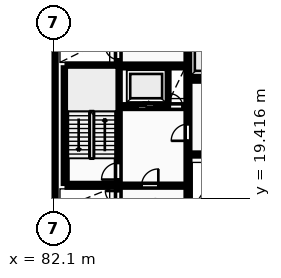
"""IFC4 building model, lengths in metres.
Left out: names, types, materials, properties, quantities, classifications, styles, units other than length and angle.
Written with IfcOpenShell. Run it as: python <this file> out.ifc"""

import sys

from ifc_helpers import new_model, si_unit, direction, frame, frame_2d, origin, place, context, subcontext, project, spatial, rectangle, extrude, element, fill, save


model = new_model("IFC4")
c1 = context("Model", 3, precision=1e-05, world=origin(), true_north=direction((0.0, 1.0)))
c2 = subcontext(c1, "Body", "Model", "MODEL_VIEW")
j1 = project(units=[si_unit("LENGTHUNIT", "METRE"), si_unit("PLANEANGLEUNIT", "RADIAN")], contexts=[c1])
p1 = place(None, origin())
s1 = spatial("IfcSite", under=j1, at=p1, CompositionType="ELEMENT")
p2 = place(p1, origin())
s2 = spatial("IfcBuilding", under=s1, at=p2, CompositionType="ELEMENT")
p3 = place(p2, frame((0.0, 0.0, 14.5)))
s3 = spatial("IfcBuildingStorey", under=s2, at=p3, CompositionType="ELEMENT", Elevation=14.5)
p4 = place(p3, frame((82.1, 18.575, 0.0), z_axis=(0.0, 0.0, 1.0), x_axis=(0.0, 1.0, 0.0)))
e1 = element("IfcWall", 1, at=p4, inside=s3, PredefinedType="SHEAR", context=c2, shape_type="SweptSolid", body=[
    extrude(rectangle(XDim=11.65, YDim=0.35, at=frame_2d((5.825, 0.0))), origin(), (0.0, 0.0, 1.0), 4.5),
])
p5 = place(p3, frame((82.875, 20.4, 0.0), z_axis=(0.0, 0.0, 1.0), x_axis=(0.0, 1.0, 0.0)))
e2 = element("IfcWall", 2, at=p5, inside=s3, PredefinedType="SHEAR", context=c2, shape_type="SweptSolid", body=[
    extrude(rectangle(XDim=7.6, YDim=0.25, at=frame_2d((3.8, 0.0))), origin(), (0.0, 0.0, 1.0), 4.5),
])
p6 = place(p3, frame((86.365, 18.6, 0.0), z_axis=(0.0, 0.0, 1.0), x_axis=(0.0, 1.0, 0.0)))
e3 = element("IfcWall", 3, at=p6, inside=s3, PredefinedType="SHEAR", context=c2, shape_type="SweptSolid", body=[
    extrude(rectangle(XDim=11.6, YDim=0.25, at=frame_2d((5.8, 0.0))), origin(), (0.0, 0.0, 1.0), 4.5),
])
p7 = place(p6, frame((0.45, 0.0, 0.0)))
e4 = element("IfcOpeningElement", 4, at=p7, cuts=e3, PredefinedType="OPENING", context=c2, shape_type="SweptSolid", body=[
    extrude(rectangle(XDim=0.85, YDim=2.05, at=frame_2d((0.425, 1.025))), frame((0.0, 0.135, 0.0), z_axis=(0.0, -1.0, 0.0), x_axis=(1.0, 0.0, 0.0)), (0.0, 0.0, 1.0), 0.27),
])
p8 = place(p6, frame((2.05, 0.0, 0.0)))
e5 = element("IfcOpeningElement", 5, at=p8, cuts=e3, PredefinedType="OPENING", context=c2, shape_type="SweptSolid", body=[
    extrude(rectangle(XDim=1.1, YDim=2.1, at=frame_2d((0.55, 1.05))), frame((0.0, 0.135, 0.0), z_axis=(0.0, -1.0, 0.0), x_axis=(1.0, 0.0, 0.0)), (0.0, 0.0, 1.0), 0.27),
])
p9 = place(p6, frame((9.95, 0.0, 0.0)))
e6 = element("IfcOpeningElement", 6, at=p9, cuts=e3, PredefinedType="OPENING", context=c2, shape_type="SweptSolid", body=[
    extrude(rectangle(XDim=0.85, YDim=2.05, at=frame_2d((0.425, 1.025))), frame((0.0, 0.135, 0.0), z_axis=(0.0, -1.0, 0.0), x_axis=(1.0, 0.0, 0.0)), (0.0, 0.0, 1.0), 0.27),
])
p10 = place(p3, frame((83.0, 20.275, 0.0), z_axis=(0.0, 0.0, 1.0), x_axis=(1.0, 0.0, 0.0)))
e7 = element("IfcWall", 7, at=p10, inside=s3, PredefinedType="SHEAR", context=c2, shape_type="SweptSolid", body=[
    extrude(rectangle(XDim=3.24, YDim=0.25, at=frame_2d((1.62, 0.0))), origin(), (0.0, 0.0, 1.0), 4.5),
])
p11 = place(p3, frame((83.0, 28.125, 0.0), z_axis=(0.0, 0.0, 1.0), x_axis=(1.0, 0.0, 0.0)))
e8 = element("IfcWall", 8, at=p11, inside=s3, PredefinedType="SHEAR", context=c2, shape_type="SweptSolid", body=[
    extrude(rectangle(XDim=7.82, YDim=0.25, at=frame_2d((3.91, 0.0))), origin(), (0.0, 0.0, 1.0), 4.5),
])
p12 = place(p3, frame((86.5, 25.45, 0.0), z_axis=(0.0, 0.0, 1.0), x_axis=(1.0, 0.0, 0.0)))
e9 = element("IfcWall", 9, at=p12, inside=s3, PredefinedType="SHEAR", context=c2, shape_type="SweptSolid", body=[
    extrude(rectangle(XDim=4.32, YDim=0.25, at=frame_2d((2.16, 0.0))), origin(), (0.0, 0.0, 1.0), 4.5),
])
p13 = place(p12, frame((1.14, 0.0, 0.0)))
e10 = element("IfcOpeningElement", 10, at=p13, cuts=e9, PredefinedType="OPENING", context=c2, shape_type="SweptSolid", body=[
    extrude(rectangle(XDim=1.12, YDim=2.12, at=frame_2d((0.56, 1.06))), frame((0.0, 0.135, 0.0), z_axis=(0.0, -1.0, 0.0), x_axis=(1.0, 0.0, 0.0)), (0.0, 0.0, 1.0), 0.27),
])
p14 = place(p12, frame((3.25, 0.0, 0.0)))
e11 = element("IfcOpeningElement", 11, at=p14, cuts=e9, PredefinedType="OPENING", context=c2, shape_type="SweptSolid", body=[
    extrude(rectangle(XDim=0.85, YDim=2.05, at=frame_2d((0.425, 1.025))), frame((0.0, 0.135, 0.0), z_axis=(0.0, -1.0, 0.0), x_axis=(1.0, 0.0, 0.0)), (0.0, 0.0, 1.0), 0.27),
])
p15 = place(p3, frame((89.6, 25.58, 0.0), z_axis=(0.0, 0.0, 1.0), x_axis=(0.0, 1.0, 0.0)))
e12 = element("IfcWall", 12, at=p15, inside=s3, PredefinedType="PARTITIONING", context=c2, shape_type="SweptSolid", body=[
    extrude(rectangle(XDim=2.42, YDim=0.2, at=frame_2d((1.21, 0.0))), origin(), (0.0, 0.0, 1.0), 4.18),
])
p16 = place(p3, frame((86.5, 20.25, 0.0), z_axis=(0.0, 0.0, 1.0), x_axis=(1.0, 0.0, 0.0)))
e13 = element("IfcWall", 13, at=p16, inside=s3, PredefinedType="PARTITIONING", context=c2, shape_type="SweptSolid", body=[
    extrude(rectangle(XDim=4.32, YDim=0.2, at=frame_2d((2.16, 0.0))), origin(), (0.0, 0.0, 1.0), 4.18),
])
p17 = place(p16, frame((1.4, 0.0, 0.0)))
e14 = element("IfcOpeningElement", 14, at=p17, cuts=e13, PredefinedType="OPENING", context=c2, shape_type="SweptSolid", body=[
    extrude(rectangle(XDim=1.1, YDim=2.1, at=frame_2d((0.55, 1.05))), frame((0.0, 0.11, 0.0), z_axis=(0.0, -1.0, 0.0), x_axis=(1.0, 0.0, 0.0)), (0.0, 0.0, 1.0), 0.22),
])
p18 = place(p3, frame((90.95, 18.6, 0.0), z_axis=(0.0, 0.0, 1.0), x_axis=(0.0, 1.0, 0.0)))
e15 = element("IfcWall", 15, at=p18, inside=s3, PredefinedType="SHEAR", context=c2, shape_type="SweptSolid", body=[
    extrude(rectangle(XDim=11.6, YDim=0.25, at=frame_2d((5.8, 0.0))), origin(), (0.0, 0.0, 1.0), 4.5),
])
p19 = place(p18, frame((4.6, 0.0, 0.0)))
e16 = element("IfcOpeningElement", 16, at=p19, cuts=e15, PredefinedType="OPENING", context=c2, shape_type="SweptSolid", body=[
    extrude(rectangle(XDim=1.1, YDim=2.1, at=frame_2d((0.55, 1.05))), frame((0.0, 0.135, 0.0), z_axis=(0.0, -1.0, 0.0), x_axis=(1.0, 0.0, 0.0)), (0.0, 0.0, 1.0), 0.27),
])
p20 = place(p3, frame((91.08, 27.25, 0.0), z_axis=(0.0, 0.0, 1.0), x_axis=(1.0, 0.0, 0.0)))
e17 = element("IfcWall", 17, at=p20, inside=s3, PredefinedType="SHEAR", context=c2, shape_type="SweptSolid", body=[
    extrude(rectangle(XDim=8.34, YDim=0.25, at=frame_2d((4.17, 0.0))), origin(), (0.0, 0.0, 1.0), 4.5),
])
p21 = place(p20, frame((0.76, 0.0, 0.0)))
e18 = element("IfcOpeningElement", 18, at=p21, cuts=e17, PredefinedType="OPENING", context=c2, shape_type="SweptSolid", body=[
    extrude(rectangle(XDim=1.12, YDim=2.12, at=frame_2d((0.56, 1.06))), frame((0.0, 0.135, 0.0), z_axis=(0.0, -1.0, 0.0), x_axis=(1.0, 0.0, 0.0)), (0.0, 0.0, 1.0), 0.27),
])
p22 = place(p20, frame((3.56, 0.0, 0.0)))
e19 = element("IfcOpeningElement", 19, at=p22, cuts=e17, PredefinedType="OPENING", context=c2, shape_type="SweptSolid", body=[
    extrude(rectangle(XDim=1.12, YDim=2.12, at=frame_2d((0.56, 1.06))), frame((0.0, 0.135, 0.0), z_axis=(0.0, -1.0, 0.0), x_axis=(1.0, 0.0, 0.0)), (0.0, 0.0, 1.0), 0.27),
])
p23 = place(p20, frame((6.36, 0.0, 0.0)))
e20 = element("IfcOpeningElement", 20, at=p23, cuts=e17, PredefinedType="OPENING", context=c2, shape_type="SweptSolid", body=[
    extrude(rectangle(XDim=1.12, YDim=2.12, at=frame_2d((0.56, 1.06))), frame((0.0, 0.135, 0.0), z_axis=(0.0, -1.0, 0.0), x_axis=(1.0, 0.0, 0.0)), (0.0, 0.0, 1.0), 0.27),
])
p24 = place(p3, frame((91.08, 22.3, 0.0), z_axis=(0.0, 0.0, 1.0), x_axis=(1.0, 0.0, 0.0)))
e21 = element("IfcWall", 21, at=p24, inside=s3, PredefinedType="PARTITIONING", context=c2, shape_type="SweptSolid", body=[
    extrude(rectangle(XDim=19.14, YDim=0.2, at=frame_2d((9.57, 0.0))), origin(), (0.0, 0.0, 1.0), 4.18),
])
p25 = place(p24, frame((1.15, 0.0, 0.0)))
e22 = element("IfcOpeningElement", 22, at=p25, cuts=e21, PredefinedType="OPENING", context=c2, shape_type="SweptSolid", body=[
    extrude(rectangle(XDim=0.85, YDim=2.05, at=frame_2d((0.425, 1.025))), frame((0.0, 0.11, 0.0), z_axis=(0.0, -1.0, 0.0), x_axis=(1.0, 0.0, 0.0)), (0.0, 0.0, 1.0), 0.22),
])
p26 = place(p24, frame((3.2, 0.0, 0.0)))
e23 = element("IfcOpeningElement", 23, at=p26, cuts=e21, PredefinedType="OPENING", context=c2, shape_type="SweptSolid", body=[
    extrude(rectangle(XDim=0.85, YDim=2.05, at=frame_2d((0.425, 1.025))), frame((0.0, 0.11, 0.0), z_axis=(0.0, -1.0, 0.0), x_axis=(1.0, 0.0, 0.0)), (0.0, 0.0, 1.0), 0.22),
])
p27 = place(p24, frame((12.72, 0.0, 0.0)))
e24 = element("IfcOpeningElement", 24, at=p27, cuts=e21, PredefinedType="OPENING", context=c2, shape_type="SweptSolid", body=[
    extrude(rectangle(XDim=1.5, YDim=2.2, at=frame_2d((0.75, 1.1))), frame((0.0, 0.11, 0.0), z_axis=(0.0, -1.0, 0.0), x_axis=(1.0, 0.0, 0.0)), (0.0, 0.0, 1.0), 0.22),
])
p28 = place(p24, frame((5.52, 0.0, 0.0)))
e25 = element("IfcOpeningElement", 25, at=p28, cuts=e21, PredefinedType="OPENING", context=c2, shape_type="SweptSolid", body=[
    extrude(rectangle(XDim=0.88, YDim=2.06, at=frame_2d((0.44, 1.03))), frame((0.0, 0.11, 0.0), z_axis=(0.0, -1.0, 0.0), x_axis=(1.0, 0.0, 0.0)), (0.0, 0.0, 1.0), 0.22),
])
p29 = place(p24, frame((7.67, 0.0, 0.0)))
e26 = element("IfcOpeningElement", 26, at=p29, cuts=e21, PredefinedType="OPENING", context=c2, shape_type="SweptSolid", body=[
    extrude(rectangle(XDim=0.88, YDim=2.06, at=frame_2d((0.44, 1.03))), frame((0.0, 0.11, 0.0), z_axis=(0.0, -1.0, 0.0), x_axis=(1.0, 0.0, 0.0)), (0.0, 0.0, 1.0), 0.22),
])
p30 = place(p24, frame((10.27, 0.0, 0.0)))
e27 = element("IfcOpeningElement", 27, at=p30, cuts=e21, PredefinedType="OPENING", context=c2, shape_type="SweptSolid", body=[
    extrude(rectangle(XDim=0.85, YDim=2.05, at=frame_2d((0.425, 1.025))), frame((0.0, 0.11, 0.0), z_axis=(0.0, -1.0, 0.0), x_axis=(1.0, 0.0, 0.0)), (0.0, 0.0, 1.0), 0.22),
])
p31 = place(p24, frame((15.92, 0.0, 0.0)))
e28 = element("IfcOpeningElement", 28, at=p31, cuts=e21, PredefinedType="OPENING", context=c2, shape_type="SweptSolid", body=[
    extrude(rectangle(XDim=0.96, YDim=2.1, at=frame_2d((0.48, 1.05))), frame((0.0, 0.11, 0.0), z_axis=(0.0, -1.0, 0.0), x_axis=(1.0, 0.0, 0.0)), (0.0, 0.0, 1.0), 0.22),
])
p32 = place(p7, origin())
e29 = element("IfcDoor", 29, at=p32, inside=s3, OperationType="SINGLE_SWING_RIGHT", PredefinedType="DOOR", context=c2, shape_type="SweptSolid", body=[
    extrude(rectangle(XDim=0.85, YDim=2.05, at=frame_2d((0.425, 1.025))), frame((0.0, 0.025, 0.0), z_axis=(0.0, -1.0, 0.0), x_axis=(1.0, 0.0, 0.0)), (0.0, 0.0, 1.0), 0.05),
])
fill(e4, e29)
p33 = place(p8, origin())
e30 = element("IfcDoor", 30, at=p33, inside=s3, OperationType="SINGLE_SWING_LEFT", PredefinedType="DOOR", context=c2, shape_type="SweptSolid", body=[
    extrude(rectangle(XDim=1.1, YDim=2.1, at=frame_2d((0.55, 1.05))), frame((0.0, 0.025, 0.0), z_axis=(0.0, -1.0, 0.0), x_axis=(1.0, 0.0, 0.0)), (0.0, 0.0, 1.0), 0.05),
])
fill(e5, e30)
p34 = place(p9, origin())
e31 = element("IfcDoor", 31, at=p34, inside=s3, OperationType="SINGLE_SWING_RIGHT", PredefinedType="DOOR", context=c2, shape_type="SweptSolid", body=[
    extrude(rectangle(XDim=0.85, YDim=2.05, at=frame_2d((0.425, 1.025))), frame((0.0, 0.025, 0.0), z_axis=(0.0, -1.0, 0.0), x_axis=(1.0, 0.0, 0.0)), (0.0, 0.0, 1.0), 0.05),
])
fill(e6, e31)
p35 = place(p13, origin())
e32 = element("IfcDoor", 32, at=p35, inside=s3, OperationType="SLIDING_TO_RIGHT", PredefinedType="DOOR", context=c2, shape_type="SweptSolid", body=[
    extrude(rectangle(XDim=1.12, YDim=2.12, at=frame_2d((0.56, 1.06))), frame((0.0, 0.025, 0.0), z_axis=(0.0, -1.0, 0.0), x_axis=(1.0, 0.0, 0.0)), (0.0, 0.0, 1.0), 0.05),
])
fill(e10, e32)
p36 = place(p14, origin())
e33 = element("IfcDoor", 33, at=p36, inside=s3, OperationType="SINGLE_SWING_LEFT", PredefinedType="DOOR", context=c2, shape_type="SweptSolid", body=[
    extrude(rectangle(XDim=0.85, YDim=2.05, at=frame_2d((0.425, 1.025))), frame((0.0, 0.025, 0.0), z_axis=(0.0, -1.0, 0.0), x_axis=(1.0, 0.0, 0.0)), (0.0, 0.0, 1.0), 0.05),
])
fill(e11, e33)
p37 = place(p17, origin())
e34 = element("IfcDoor", 34, at=p37, inside=s3, OperationType="SINGLE_SWING_RIGHT", PredefinedType="DOOR", context=c2, shape_type="SweptSolid", body=[
    extrude(rectangle(XDim=1.1, YDim=2.1, at=frame_2d((0.55, 1.05))), frame((0.0, 0.025, 0.0), z_axis=(0.0, -1.0, 0.0), x_axis=(1.0, 0.0, 0.0)), (0.0, 0.0, 1.0), 0.05),
])
fill(e14, e34)
p38 = place(p19, origin())
e35 = element("IfcDoor", 35, at=p38, inside=s3, OperationType="SINGLE_SWING_LEFT", PredefinedType="DOOR", context=c2, shape_type="SweptSolid", body=[
    extrude(rectangle(XDim=1.1, YDim=2.1, at=frame_2d((0.55, 1.05))), frame((0.0, 0.025, 0.0), z_axis=(0.0, -1.0, 0.0), x_axis=(1.0, 0.0, 0.0)), (0.0, 0.0, 1.0), 0.05),
])
fill(e16, e35)
save(model, sys.argv[1])
